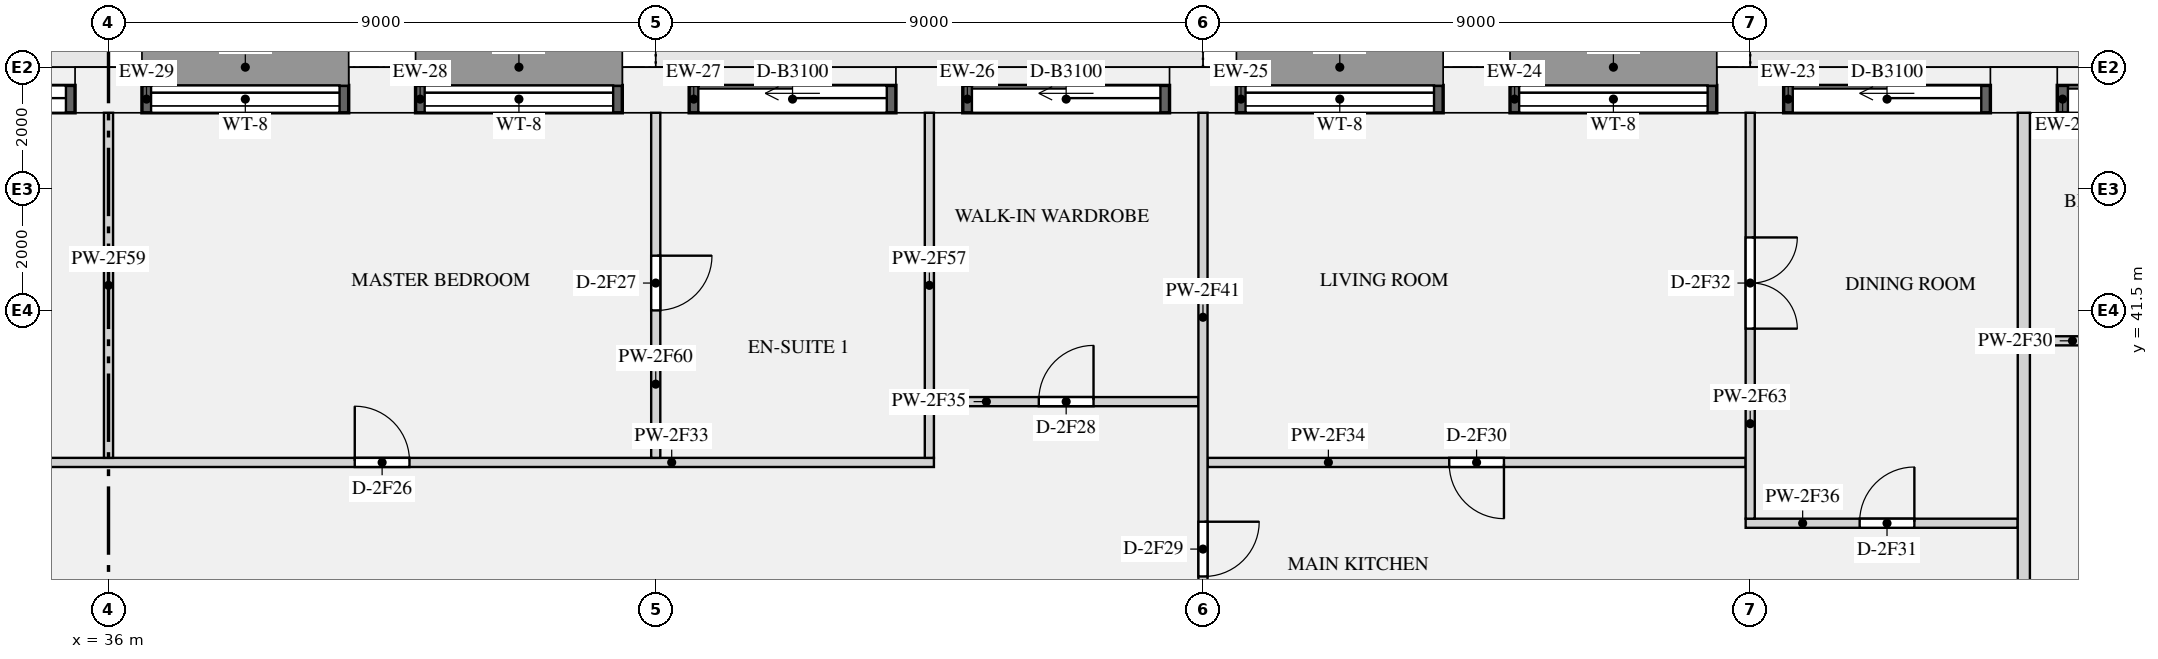
"""IFC4 building model, lengths in metres.
Left out: names, types, materials, properties, quantities, classifications, styles, units other than length and angle.
Written with IfcOpenShell. Run it as: python <this file> out.ifc"""

import sys

from ifc_helpers import new_model, si_unit, direction, frame, frame_2d, origin, origin_2d, place, context, subcontext, project, spatial, rectangle, extrude, element, fill, save


model = new_model("IFC4")
c1 = context("Model", 3, precision=1e-05, world=origin(), true_north=direction((0.0, 1.0)))
c2 = subcontext(c1, "Body", "Model", "MODEL_VIEW")
j1 = project(units=[si_unit("LENGTHUNIT", "METRE"), si_unit("PLANEANGLEUNIT", "RADIAN")], contexts=[c1])
p1 = place(None, origin())
s1 = spatial("IfcSite", under=j1, at=p1, CompositionType="ELEMENT")
p2 = place(p1, origin())
s2 = spatial("IfcBuilding", under=s1, at=p2, CompositionType="ELEMENT")
p3 = place(p2, frame((0.0, 0.0, 124.5)))
s3 = spatial("IfcBuildingStorey", under=s2, at=p3, CompositionType="ELEMENT", Elevation=124.5)
for number, where, z_axis, x_axis in (
    (1, (67.5, 45.125, 0.0), (0.0, 0.0, 1.0), (-1.0, 0.0, 0.0)),
    (2, (63.0, 45.125, 0.0), (0.0, 0.0, 1.0), (-1.0, 0.0, 0.0)),
    (3, (58.5, 45.125, 0.0), (0.0, 0.0, 1.0), (-1.0, 0.0, 0.0)),
    (4, (54.0, 45.125, 0.0), (0.0, 0.0, 1.0), (-1.0, 0.0, 0.0)),
    (5, (49.5, 45.125, 0.0), (0.0, 0.0, 1.0), (-1.0, 0.0, 0.0)),
    (6, (45.0, 45.125, 0.0), (0.0, 0.0, 1.0), (-1.0, 0.0, 0.0)),
    (7, (40.5, 45.125, 0.0), (0.0, 0.0, 1.0), (-1.0, 0.0, 0.0)),
    (8, (36.0, 45.125, 0.0), (0.0, 0.0, 1.0), (-1.0, 0.0, 0.0)),
):
    element("IfcColumn", number, at=place(p3, frame(where, z_axis=z_axis, x_axis=x_axis)), inside=s3, PredefinedType="USERDEFINED", context=c2, shape_type="SweptSolid", body=[
        extrude(rectangle(XDim=1.1, YDim=0.75, at=origin_2d()), origin(), (0.0, 0.0, 1.0), 3.15),
    ])
p4 = place(p3, frame((70.9, 44.975, 0.0), z_axis=(0.0, 0.0, 1.0), x_axis=(-1.0, 0.0, 0.0)))
e9 = element("IfcWall", 9, at=p4, inside=s3, PredefinedType="SOLIDWALL", context=c2, shape_type="SweptSolid", body=[
    extrude(rectangle(XDim=2.85, YDim=0.45, at=frame_2d((1.425, 0.0))), origin(), (0.0, 0.0, 1.0), 2.83),
])
p5 = place(p4, frame((0.175, 0.0, 0.0)))
e10 = element("IfcOpeningElement", 10, at=p5, cuts=e9, PredefinedType="OPENING", context=c2, shape_type="SweptSolid", body=[
    extrude(rectangle(XDim=2.5, YDim=2.3, at=frame_2d((1.25, 1.15))), frame((0.0, 0.235, 0.0), z_axis=(0.0, -1.0, 0.0), x_axis=(1.0, 0.0, 0.0)), (0.0, 0.0, 1.0), 0.47),
])
p6 = place(p3, frame((66.95, 44.975, 0.0), z_axis=(0.0, 0.0, 1.0), x_axis=(-1.0, 0.0, 0.0)))
e11 = element("IfcWall", 11, at=p6, inside=s3, PredefinedType="SOLIDWALL", context=c2, shape_type="SweptSolid", body=[
    extrude(rectangle(XDim=3.4, YDim=0.45, at=frame_2d((1.7, 0.0))), origin(), (0.0, 0.0, 1.0), 2.83),
])
p7 = place(p6, frame((0.15, 0.0, 0.0)))
e12 = element("IfcOpeningElement", 12, at=p7, cuts=e11, PredefinedType="OPENING", context=c2, shape_type="SweptSolid", body=[
    extrude(rectangle(XDim=3.1, YDim=2.3, at=frame_2d((1.55, 1.15))), frame((0.0, 0.235, 0.0), z_axis=(0.0, -1.0, 0.0), x_axis=(1.0, 0.0, 0.0)), (0.0, 0.0, 1.0), 0.47),
])
p8 = place(p3, frame((62.45, 44.975, 0.9), z_axis=(0.0, 0.0, 1.0), x_axis=(-1.0, 0.0, 0.0)))
e13 = element("IfcWall", 13, at=p8, inside=s3, PredefinedType="SOLIDWALL", context=c2, shape_type="SweptSolid", body=[
    extrude(rectangle(XDim=3.4, YDim=0.45, at=frame_2d((1.7, 0.0))), origin(), (0.0, 0.0, 1.0), 1.93),
])
p9 = place(p8, frame((0.15, 0.0, 0.15)))
e14 = element("IfcOpeningElement", 14, at=p9, cuts=e13, PredefinedType="OPENING", context=c2, shape_type="SweptSolid", body=[
    extrude(rectangle(XDim=3.1, YDim=1.5, at=frame_2d((1.55, 0.75))), frame((0.0, 0.235, 0.0), z_axis=(0.0, -1.0, 0.0), x_axis=(1.0, 0.0, 0.0)), (0.0, 0.0, 1.0), 0.47),
])
p10 = place(p3, frame((57.95, 44.975, 0.9), z_axis=(0.0, 0.0, 1.0), x_axis=(-1.0, 0.0, 0.0)))
e15 = element("IfcWall", 15, at=p10, inside=s3, PredefinedType="SOLIDWALL", context=c2, shape_type="SweptSolid", body=[
    extrude(rectangle(XDim=3.4, YDim=0.45, at=frame_2d((1.7, 0.0))), origin(), (0.0, 0.0, 1.0), 1.93),
])
p11 = place(p10, frame((0.15, 0.0, 0.15)))
e16 = element("IfcOpeningElement", 16, at=p11, cuts=e15, PredefinedType="OPENING", context=c2, shape_type="SweptSolid", body=[
    extrude(rectangle(XDim=3.1, YDim=1.5, at=frame_2d((1.55, 0.75))), frame((0.0, 0.235, 0.0), z_axis=(0.0, -1.0, 0.0), x_axis=(1.0, 0.0, 0.0)), (0.0, 0.0, 1.0), 0.47),
])
p12 = place(p3, frame((53.45, 44.975, 0.0), z_axis=(0.0, 0.0, 1.0), x_axis=(-1.0, 0.0, 0.0)))
e17 = element("IfcWall", 17, at=p12, inside=s3, PredefinedType="SOLIDWALL", context=c2, shape_type="SweptSolid", body=[
    extrude(rectangle(XDim=3.4, YDim=0.45, at=frame_2d((1.7, 0.0))), origin(), (0.0, 0.0, 1.0), 2.83),
])
p13 = place(p12, frame((0.15, 0.0, 0.0)))
e18 = element("IfcOpeningElement", 18, at=p13, cuts=e17, PredefinedType="OPENING", context=c2, shape_type="SweptSolid", body=[
    extrude(rectangle(XDim=3.1, YDim=2.3, at=frame_2d((1.55, 1.15))), frame((0.0, 0.235, 0.0), z_axis=(0.0, -1.0, 0.0), x_axis=(1.0, 0.0, 0.0)), (0.0, 0.0, 1.0), 0.47),
])
p14 = place(p3, frame((48.95, 44.975, 0.0), z_axis=(0.0, 0.0, 1.0), x_axis=(-1.0, 0.0, 0.0)))
e19 = element("IfcWall", 19, at=p14, inside=s3, PredefinedType="SOLIDWALL", context=c2, shape_type="SweptSolid", body=[
    extrude(rectangle(XDim=3.4, YDim=0.45, at=frame_2d((1.7, 0.0))), origin(), (0.0, 0.0, 1.0), 2.83),
])
p15 = place(p14, frame((0.15, 0.0, 0.0)))
e20 = element("IfcOpeningElement", 20, at=p15, cuts=e19, PredefinedType="OPENING", context=c2, shape_type="SweptSolid", body=[
    extrude(rectangle(XDim=3.1, YDim=2.3, at=frame_2d((1.55, 1.15))), frame((0.0, 0.235, 0.0), z_axis=(0.0, -1.0, 0.0), x_axis=(1.0, 0.0, 0.0)), (0.0, 0.0, 1.0), 0.47),
])
p16 = place(p3, frame((44.45, 44.975, 0.9), z_axis=(0.0, 0.0, 1.0), x_axis=(-1.0, 0.0, 0.0)))
e21 = element("IfcWall", 21, at=p16, inside=s3, PredefinedType="SOLIDWALL", context=c2, shape_type="SweptSolid", body=[
    extrude(rectangle(XDim=3.4, YDim=0.45, at=frame_2d((1.7, 0.0))), origin(), (0.0, 0.0, 1.0), 1.93),
])
p17 = place(p16, frame((0.15, 0.0, 0.15)))
e22 = element("IfcOpeningElement", 22, at=p17, cuts=e21, PredefinedType="OPENING", context=c2, shape_type="SweptSolid", body=[
    extrude(rectangle(XDim=3.1, YDim=1.5, at=frame_2d((1.55, 0.75))), frame((0.0, 0.235, 0.0), z_axis=(0.0, -1.0, 0.0), x_axis=(1.0, 0.0, 0.0)), (0.0, 0.0, 1.0), 0.47),
])
p18 = place(p3, frame((39.95, 44.975, 0.9), z_axis=(0.0, 0.0, 1.0), x_axis=(-1.0, 0.0, 0.0)))
e23 = element("IfcWall", 23, at=p18, inside=s3, PredefinedType="SOLIDWALL", context=c2, shape_type="SweptSolid", body=[
    extrude(rectangle(XDim=3.4, YDim=0.45, at=frame_2d((1.7, 0.0))), origin(), (0.0, 0.0, 1.0), 1.93),
])
p19 = place(p18, frame((0.15, 0.0, 0.15)))
e24 = element("IfcOpeningElement", 24, at=p19, cuts=e23, PredefinedType="OPENING", context=c2, shape_type="SweptSolid", body=[
    extrude(rectangle(XDim=3.1, YDim=1.5, at=frame_2d((1.55, 0.75))), frame((0.0, 0.235, 0.0), z_axis=(0.0, -1.0, 0.0), x_axis=(1.0, 0.0, 0.0)), (0.0, 0.0, 1.0), 0.47),
])
p20 = place(p3, frame((35.45, 44.975, 0.0), z_axis=(0.0, 0.0, 1.0), x_axis=(-1.0, 0.0, 0.0)))
e25 = element("IfcWall", 25, at=p20, inside=s3, PredefinedType="SOLIDWALL", context=c2, shape_type="SweptSolid", body=[
    extrude(rectangle(XDim=3.4, YDim=0.45, at=frame_2d((1.7, 0.0))), origin(), (0.0, 0.0, 1.0), 2.83),
])
p21 = place(p20, frame((0.15, 0.0, 0.0)))
e26 = element("IfcOpeningElement", 26, at=p21, cuts=e25, PredefinedType="OPENING", context=c2, shape_type="SweptSolid", body=[
    extrude(rectangle(XDim=3.1, YDim=2.3, at=frame_2d((1.55, 1.15))), frame((0.0, 0.235, 0.0), z_axis=(0.0, -1.0, 0.0), x_axis=(1.0, 0.0, 0.0)), (0.0, 0.0, 1.0), 0.47),
])
p22 = place(p3, frame((67.6, 41.0, 0.0), z_axis=(0.0, 0.0, 1.0), x_axis=(1.0, 0.0, 0.0)))
e27 = element("IfcWall", 27, at=p22, inside=s3, PredefinedType="PARTITIONING", context=c2, shape_type="SweptSolid", body=[
    extrude(rectangle(XDim=3.65, YDim=0.15, at=frame_2d((1.825, 0.0))), origin(), (0.0, 0.0, 1.0), 2.83),
])
p23 = place(p22, frame((1.4, 0.0, 0.0)))
e28 = element("IfcOpeningElement", 28, at=p23, cuts=e27, PredefinedType="OPENING", context=c2, shape_type="SweptSolid", body=[
    extrude(rectangle(XDim=0.9, YDim=2.1, at=frame_2d((0.45, 1.05))), frame((0.0, 0.085, 0.0), z_axis=(0.0, -1.0, 0.0), x_axis=(1.0, 0.0, 0.0)), (0.0, 0.0, 1.0), 0.17),
])
p24 = place(p3, frame((27.1, 39.0, 0.0), z_axis=(0.0, 0.0, 1.0), x_axis=(1.0, 0.0, 0.0)))
e29 = element("IfcWall", 29, at=p24, inside=s3, PredefinedType="PARTITIONING", context=c2, shape_type="SweptSolid", body=[
    extrude(rectangle(XDim=22.475, YDim=0.15, at=frame_2d((11.237, 0.0))), origin(), (0.0, 0.0, 1.0), 2.83),
])
p25 = place(p24, frame((1.7, 0.0, 0.0)))
e30 = element("IfcOpeningElement", 30, at=p25, cuts=e29, PredefinedType="OPENING", context=c2, shape_type="SweptSolid", body=[
    extrude(rectangle(XDim=0.9, YDim=2.1, at=frame_2d((0.45, 1.05))), frame((0.0, 0.085, 0.0), z_axis=(0.0, -1.0, 0.0), x_axis=(1.0, 0.0, 0.0)), (0.0, 0.0, 1.0), 0.17),
])
p26 = place(p24, frame((6.2, 0.0, 0.0)))
e31 = element("IfcOpeningElement", 31, at=p26, cuts=e29, PredefinedType="OPENING", context=c2, shape_type="SweptSolid", body=[
    extrude(rectangle(XDim=0.9, YDim=2.1, at=frame_2d((0.45, 1.05))), frame((0.0, 0.085, 0.0), z_axis=(0.0, -1.0, 0.0), x_axis=(1.0, 0.0, 0.0)), (0.0, 0.0, 1.0), 0.17),
])
p27 = place(p24, frame((12.95, 0.0, 0.0)))
e32 = element("IfcOpeningElement", 32, at=p27, cuts=e29, PredefinedType="OPENING", context=c2, shape_type="SweptSolid", body=[
    extrude(rectangle(XDim=0.9, YDim=2.1, at=frame_2d((0.45, 1.05))), frame((0.0, 0.085, 0.0), z_axis=(0.0, -1.0, 0.0), x_axis=(1.0, 0.0, 0.0)), (0.0, 0.0, 1.0), 0.17),
])
p28 = place(p3, frame((54.075, 39.0, 0.0), z_axis=(0.0, 0.0, 1.0), x_axis=(1.0, 0.0, 0.0)))
e33 = element("IfcWall", 33, at=p28, inside=s3, PredefinedType="PARTITIONING", context=c2, shape_type="SweptSolid", body=[
    extrude(rectangle(XDim=8.85, YDim=0.15, at=frame_2d((4.425, 0.0))), origin(), (0.0, 0.0, 1.0), 2.83),
])
p29 = place(p28, frame((3.975, 0.0, 0.0)))
e34 = element("IfcOpeningElement", 34, at=p29, cuts=e33, PredefinedType="OPENING", context=c2, shape_type="SweptSolid", body=[
    extrude(rectangle(XDim=0.9, YDim=2.1, at=frame_2d((0.45, 1.05))), frame((0.0, 0.085, 0.0), z_axis=(0.0, -1.0, 0.0), x_axis=(1.0, 0.0, 0.0)), (0.0, 0.0, 1.0), 0.17),
])
p30 = place(p3, frame((49.575, 40.0, 0.0), z_axis=(0.0, 0.0, 1.0), x_axis=(1.0, 0.0, 0.0)))
e35 = element("IfcWall", 35, at=p30, inside=s3, PredefinedType="PARTITIONING", context=c2, shape_type="SweptSolid", body=[
    extrude(rectangle(XDim=4.35, YDim=0.15, at=frame_2d((2.175, 0.0))), origin(), (0.0, 0.0, 1.0), 2.83),
])
p31 = place(p30, frame((1.725, 0.0, 0.0)))
e36 = element("IfcOpeningElement", 36, at=p31, cuts=e35, PredefinedType="OPENING", context=c2, shape_type="SweptSolid", body=[
    extrude(rectangle(XDim=0.9, YDim=2.1, at=frame_2d((0.45, 1.05))), frame((0.0, 0.085, 0.0), z_axis=(0.0, -1.0, 0.0), x_axis=(1.0, 0.0, 0.0)), (0.0, 0.0, 1.0), 0.17),
])
p32 = place(p3, frame((62.925, 38.0, 0.0), z_axis=(0.0, 0.0, 1.0), x_axis=(1.0, 0.0, 0.0)))
e37 = element("IfcWall", 37, at=p32, inside=s3, PredefinedType="PARTITIONING", context=c2, shape_type="SweptSolid", body=[
    extrude(rectangle(XDim=4.475, YDim=0.15, at=frame_2d((2.237, 0.0))), origin(), (0.0, 0.0, 1.0), 2.83),
])
p33 = place(p32, frame((1.875, 0.0, 0.0)))
e38 = element("IfcOpeningElement", 38, at=p33, cuts=e37, PredefinedType="OPENING", context=c2, shape_type="SweptSolid", body=[
    extrude(rectangle(XDim=0.9, YDim=2.1, at=frame_2d((0.45, 1.05))), frame((0.0, 0.085, 0.0), z_axis=(0.0, -1.0, 0.0), x_axis=(1.0, 0.0, 0.0)), (0.0, 0.0, 1.0), 0.17),
])
p34 = place(p3, frame((54.0, 35.475, 0.0), z_axis=(0.0, 0.0, 1.0), x_axis=(0.0, 1.0, 0.0)))
e39 = element("IfcWall", 39, at=p34, inside=s3, PredefinedType="PARTITIONING", context=c2, shape_type="SweptSolid", body=[
    extrude(rectangle(XDim=9.275, YDim=0.15, at=frame_2d((4.637, 0.0))), origin(), (0.0, 0.0, 1.0), 2.83),
])
p35 = place(p34, frame((1.65, 0.0, 0.0)))
e40 = element("IfcOpeningElement", 40, at=p35, cuts=e39, PredefinedType="OPENING", context=c2, shape_type="SweptSolid", body=[
    extrude(rectangle(XDim=0.9, YDim=2.1, at=frame_2d((0.45, 1.05))), frame((0.0, 0.085, 0.0), z_axis=(0.0, -1.0, 0.0), x_axis=(1.0, 0.0, 0.0)), (0.0, 0.0, 1.0), 0.17),
])
for number, where, z_axis, x_axis in (
    (41, (49.5, 39.075, 0.0), (0.0, 0.0, 1.0), (0.0, 1.0, 0.0)),
    (42, (36.0, 39.075, 0.0), (0.0, 0.0, 1.0), (0.0, 1.0, 0.0)),
):
    element("IfcWall", number, at=place(p3, frame(where, z_axis=z_axis, x_axis=x_axis)), inside=s3, PredefinedType="PARTITIONING", context=c2, shape_type="SweptSolid", body=[
        extrude(rectangle(XDim=5.675, YDim=0.15, at=frame_2d((2.837, 0.0))), origin(), (0.0, 0.0, 1.0), 2.83),
    ])
p36 = place(p3, frame((45.0, 39.075, 0.0), z_axis=(0.0, 0.0, 1.0), x_axis=(0.0, 1.0, 0.0)))
e43 = element("IfcWall", 43, at=p36, inside=s3, PredefinedType="PARTITIONING", context=c2, shape_type="SweptSolid", body=[
    extrude(rectangle(XDim=5.675, YDim=0.15, at=frame_2d((2.837, 0.0))), origin(), (0.0, 0.0, 1.0), 2.83),
])
p37 = place(p36, frame((2.425, 0.0, 0.0)))
e44 = element("IfcOpeningElement", 44, at=p37, cuts=e43, PredefinedType="OPENING", context=c2, shape_type="SweptSolid", body=[
    extrude(rectangle(XDim=0.9, YDim=2.1, at=frame_2d((0.45, 1.05))), frame((0.0, 0.085, 0.0), z_axis=(0.0, -1.0, 0.0), x_axis=(1.0, 0.0, 0.0)), (0.0, 0.0, 1.0), 0.17),
])
p38 = place(p3, frame((63.0, 38.075, 0.0), z_axis=(0.0, 0.0, 1.0), x_axis=(0.0, 1.0, 0.0)))
e45 = element("IfcWall", 45, at=p38, inside=s3, PredefinedType="PARTITIONING", context=c2, shape_type="SweptSolid", body=[
    extrude(rectangle(XDim=6.675, YDim=0.15, at=frame_2d((3.337, 0.0))), origin(), (0.0, 0.0, 1.0), 2.83),
])
p39 = place(p38, frame((3.125, 0.0, 0.0)))
e46 = element("IfcOpeningElement", 46, at=p39, cuts=e45, PredefinedType="OPENING", context=c2, shape_type="SweptSolid", body=[
    extrude(rectangle(XDim=1.5, YDim=2.1, at=frame_2d((0.75, 1.05))), frame((0.0, 0.085, 0.0), z_axis=(0.0, -1.0, 0.0), x_axis=(1.0, 0.0, 0.0)), (0.0, 0.0, 1.0), 0.17),
])
p40 = place(p3, frame((67.5, 24.575, 0.0), z_axis=(0.0, 0.0, 1.0), x_axis=(0.0, 1.0, 0.0)))
e47 = element("IfcWall", 47, at=p40, inside=s3, PredefinedType="PARTITIONING", context=c2, shape_type="SweptSolid", body=[
    extrude(rectangle(XDim=20.175, YDim=0.2, at=frame_2d((10.087, 0.0))), origin(), (0.0, 0.0, 1.0), 2.83),
])
p41 = place(p5, origin())
e48 = element("IfcDoor", 48, at=p41, inside=s3, OperationType="SLIDING_TO_LEFT", PredefinedType="DOOR", context=c2, shape_type="SweptSolid", body=[
    extrude(rectangle(XDim=2.5, YDim=2.3, at=frame_2d((1.25, 1.15))), frame((0.0, -0.07, 0.0), z_axis=(0.0, -1.0, 0.0), x_axis=(1.0, 0.0, 0.0)), (0.0, 0.0, 1.0), 0.05),
])
fill(e10, e48)
p42 = place(p7, origin())
e49 = element("IfcDoor", 49, at=p42, inside=s3, OperationType="SLIDING_TO_LEFT", PredefinedType="DOOR", context=c2, shape_type="SweptSolid", body=[
    extrude(rectangle(XDim=3.1, YDim=2.3, at=frame_2d((1.55, 1.15))), frame((0.0, -0.07, 0.0), z_axis=(0.0, -1.0, 0.0), x_axis=(1.0, 0.0, 0.0)), (0.0, 0.0, 1.0), 0.05),
])
fill(e12, e49)
p43 = place(p9, origin())
e50 = element("IfcWindow", 50, at=p43, inside=s3, PartitioningType="SINGLE_PANEL", PredefinedType="WINDOW", context=c2, shape_type="SweptSolid", body=[
    extrude(rectangle(XDim=3.1, YDim=1.5, at=frame_2d((1.55, 0.75))), frame((0.0, -0.065, 0.0), z_axis=(0.0, -1.0, 0.0), x_axis=(1.0, 0.0, 0.0)), (0.0, 0.0, 1.0), 0.06),
])
fill(e14, e50)
p44 = place(p11, origin())
e51 = element("IfcWindow", 51, at=p44, inside=s3, PartitioningType="SINGLE_PANEL", PredefinedType="WINDOW", context=c2, shape_type="SweptSolid", body=[
    extrude(rectangle(XDim=3.1, YDim=1.5, at=frame_2d((1.55, 0.75))), frame((0.0, -0.065, 0.0), z_axis=(0.0, -1.0, 0.0), x_axis=(1.0, 0.0, 0.0)), (0.0, 0.0, 1.0), 0.06),
])
fill(e16, e51)
p45 = place(p13, origin())
e52 = element("IfcDoor", 52, at=p45, inside=s3, OperationType="SLIDING_TO_LEFT", PredefinedType="DOOR", context=c2, shape_type="SweptSolid", body=[
    extrude(rectangle(XDim=3.1, YDim=2.3, at=frame_2d((1.55, 1.15))), frame((0.0, -0.07, 0.0), z_axis=(0.0, -1.0, 0.0), x_axis=(1.0, 0.0, 0.0)), (0.0, 0.0, 1.0), 0.05),
])
fill(e18, e52)
p46 = place(p15, origin())
e53 = element("IfcDoor", 53, at=p46, inside=s3, OperationType="SLIDING_TO_LEFT", PredefinedType="DOOR", context=c2, shape_type="SweptSolid", body=[
    extrude(rectangle(XDim=3.1, YDim=2.3, at=frame_2d((1.55, 1.15))), frame((0.0, -0.07, 0.0), z_axis=(0.0, -1.0, 0.0), x_axis=(1.0, 0.0, 0.0)), (0.0, 0.0, 1.0), 0.05),
])
fill(e20, e53)
p47 = place(p17, origin())
e54 = element("IfcWindow", 54, at=p47, inside=s3, PartitioningType="SINGLE_PANEL", PredefinedType="WINDOW", context=c2, shape_type="SweptSolid", body=[
    extrude(rectangle(XDim=3.1, YDim=1.5, at=frame_2d((1.55, 0.75))), frame((0.0, -0.065, 0.0), z_axis=(0.0, -1.0, 0.0), x_axis=(1.0, 0.0, 0.0)), (0.0, 0.0, 1.0), 0.06),
])
fill(e22, e54)
p48 = place(p19, origin())
e55 = element("IfcWindow", 55, at=p48, inside=s3, PartitioningType="SINGLE_PANEL", PredefinedType="WINDOW", context=c2, shape_type="SweptSolid", body=[
    extrude(rectangle(XDim=3.1, YDim=1.5, at=frame_2d((1.55, 0.75))), frame((0.0, -0.065, 0.0), z_axis=(0.0, -1.0, 0.0), x_axis=(1.0, 0.0, 0.0)), (0.0, 0.0, 1.0), 0.06),
])
fill(e24, e55)
p49 = place(p21, origin())
e56 = element("IfcDoor", 56, at=p49, inside=s3, OperationType="SLIDING_TO_LEFT", PredefinedType="DOOR", context=c2, shape_type="SweptSolid", body=[
    extrude(rectangle(XDim=3.1, YDim=2.3, at=frame_2d((1.55, 1.15))), frame((0.0, -0.07, 0.0), z_axis=(0.0, -1.0, 0.0), x_axis=(1.0, 0.0, 0.0)), (0.0, 0.0, 1.0), 0.05),
])
fill(e26, e56)
p50 = place(p27, origin())
e57 = element("IfcDoor", 57, at=p50, inside=s3, OperationType="SINGLE_SWING_LEFT", PredefinedType="DOOR", context=c2, shape_type="SweptSolid", body=[
    extrude(rectangle(XDim=0.9, YDim=2.1, at=frame_2d((0.45, 1.05))), frame((0.0, 0.025, 0.0), z_axis=(0.0, -1.0, 0.0), x_axis=(1.0, 0.0, 0.0)), (0.0, 0.0, 1.0), 0.05),
])
fill(e32, e57)
p51 = place(p37, frame((0.9, 0.0, 0.0), z_axis=(0.0, 0.0, 1.0), x_axis=(-1.0, 0.0, 0.0)))
e58 = element("IfcDoor", 58, at=p51, inside=s3, OperationType="SINGLE_SWING_LEFT", PredefinedType="DOOR", context=c2, shape_type="SweptSolid", body=[
    extrude(rectangle(XDim=0.9, YDim=2.1, at=frame_2d((0.45, 1.05))), frame((0.0, 0.025, 0.0), z_axis=(0.0, -1.0, 0.0), x_axis=(1.0, 0.0, 0.0)), (0.0, 0.0, 1.0), 0.05),
])
fill(e44, e58)
p52 = place(p31, origin())
e59 = element("IfcDoor", 59, at=p52, inside=s3, OperationType="SINGLE_SWING_RIGHT", PredefinedType="DOOR", context=c2, shape_type="SweptSolid", body=[
    extrude(rectangle(XDim=0.9, YDim=2.1, at=frame_2d((0.45, 1.05))), frame((0.0, 0.025, 0.0), z_axis=(0.0, -1.0, 0.0), x_axis=(1.0, 0.0, 0.0)), (0.0, 0.0, 1.0), 0.05),
])
fill(e36, e59)
p53 = place(p35, frame((0.9, 0.0, 0.0), z_axis=(0.0, 0.0, 1.0), x_axis=(-1.0, 0.0, 0.0)))
e60 = element("IfcDoor", 60, at=p53, inside=s3, OperationType="SINGLE_SWING_LEFT", PredefinedType="DOOR", context=c2, shape_type="SweptSolid", body=[
    extrude(rectangle(XDim=0.9, YDim=2.1, at=frame_2d((0.45, 1.05))), frame((0.0, 0.025, 0.0), z_axis=(0.0, -1.0, 0.0), x_axis=(1.0, 0.0, 0.0)), (0.0, 0.0, 1.0), 0.05),
])
fill(e40, e60)
p54 = place(p29, frame((0.9, 0.0, 0.0), z_axis=(0.0, 0.0, 1.0), x_axis=(-1.0, 0.0, 0.0)))
e61 = element("IfcDoor", 61, at=p54, inside=s3, OperationType="SINGLE_SWING_LEFT", PredefinedType="DOOR", context=c2, shape_type="SweptSolid", body=[
    extrude(rectangle(XDim=0.9, YDim=2.1, at=frame_2d((0.45, 1.05))), frame((0.0, 0.025, 0.0), z_axis=(0.0, -1.0, 0.0), x_axis=(1.0, 0.0, 0.0)), (0.0, 0.0, 1.0), 0.05),
])
fill(e34, e61)
p55 = place(p33, origin())
e62 = element("IfcDoor", 62, at=p55, inside=s3, OperationType="SINGLE_SWING_RIGHT", PredefinedType="DOOR", context=c2, shape_type="SweptSolid", body=[
    extrude(rectangle(XDim=0.9, YDim=2.1, at=frame_2d((0.45, 1.05))), frame((0.0, 0.025, 0.0), z_axis=(0.0, -1.0, 0.0), x_axis=(1.0, 0.0, 0.0)), (0.0, 0.0, 1.0), 0.05),
])
fill(e38, e62)
p56 = place(p39, frame((1.5, 0.0, 0.0), z_axis=(0.0, 0.0, 1.0), x_axis=(-1.0, 0.0, 0.0)))
e63 = element("IfcDoor", 63, at=p56, inside=s3, OperationType="DOUBLE_DOOR_SINGLE_SWING", PredefinedType="DOOR", context=c2, shape_type="SweptSolid", body=[
    extrude(rectangle(XDim=1.5, YDim=2.1, at=frame_2d((0.75, 1.05))), frame((0.0, 0.025, 0.0), z_axis=(0.0, -1.0, 0.0), x_axis=(1.0, 0.0, 0.0)), (0.0, 0.0, 1.0), 0.05),
])
fill(e46, e63)
save(model, sys.argv[1])
